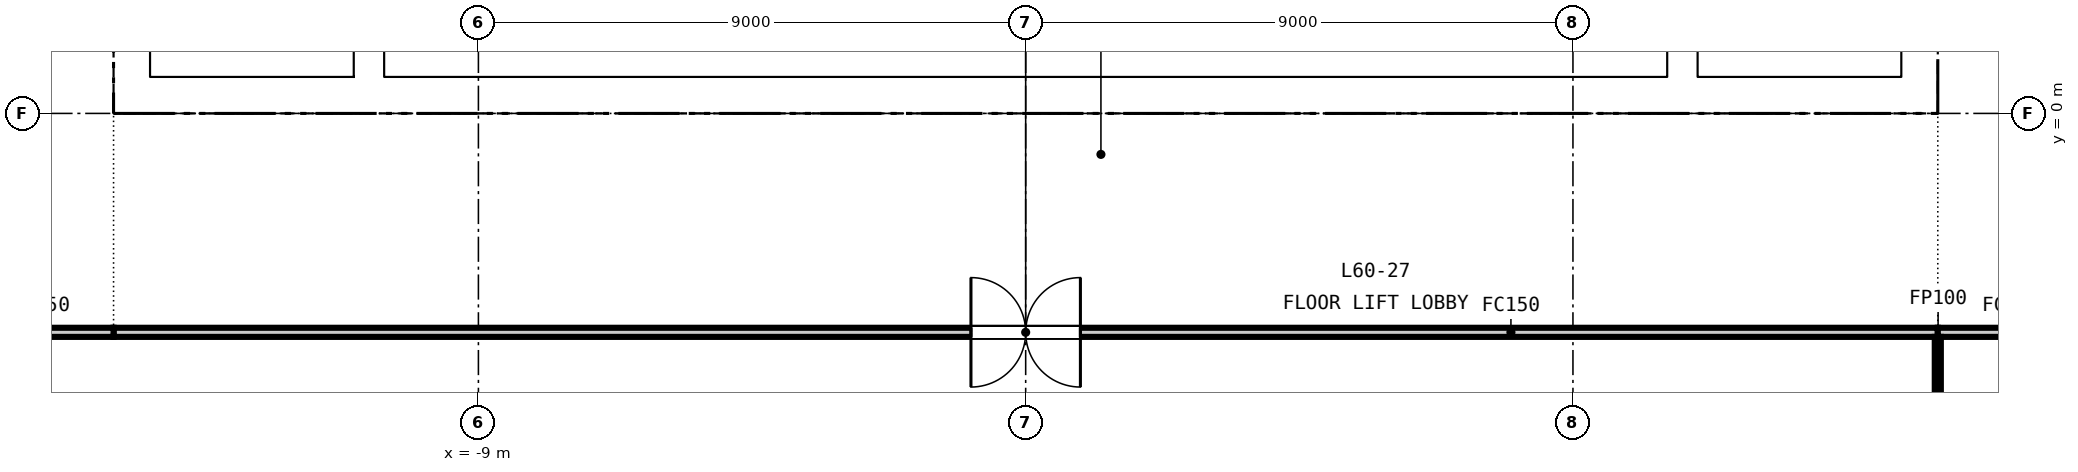
"""IFC4 building model, lengths in metres.
Left out: names, types, materials, properties, quantities, classifications, styles, units other than length and angle.
Written with IfcOpenShell. Run it as: python <this file> out.ifc"""

import sys

from ifc_helpers import new_model, si_unit, direction, frame, frame_2d, origin, place, context, subcontext, project, spatial, rectangle, extrude, element, fill, save


model = new_model("IFC4")
c1 = context("Model", 3, precision=1e-05, world=origin(), true_north=direction((0.0, 1.0)))
c2 = subcontext(c1, "Body", "Model", "MODEL_VIEW")
j1 = project(units=[si_unit("LENGTHUNIT", "METRE"), si_unit("PLANEANGLEUNIT", "RADIAN")], contexts=[c1])
p1 = place(None, origin())
s1 = spatial("IfcSite", under=j1, at=p1, CompositionType="ELEMENT")
p2 = place(p1, origin())
s2 = spatial("IfcBuilding", under=s1, at=p2, CompositionType="ELEMENT")
p3 = place(p2, frame((0.0, 0.0, 238.2)))
s3 = spatial("IfcBuildingStorey", under=s2, at=p3, CompositionType="ELEMENT", Elevation=238.2)
p4 = place(p3, frame((-15.0, 0.3, -0.15), z_axis=(0.0, 0.0, 1.0), x_axis=(1.0, 0.0, 0.0)))
e1 = element("IfcWall", 1, at=p4, inside=s3, PredefinedType="SOLIDWALL", context=c2, shape_type="SweptSolid", body=[
    extrude(rectangle(XDim=30.0, YDim=0.6, at=frame_2d((15.0, 0.0))), origin(), (0.0, 0.0, 1.0), 3.65),
])
p5 = place(p4, frame((5.8, 0.0, 0.15)))
e2 = element("IfcOpeningElement", 2, at=p5, cuts=e1, PredefinedType="OPENING", context=c2, shape_type="SweptSolid", body=[
    extrude(rectangle(XDim=2.4, YDim=2.4, at=frame_2d((1.2, 1.2))), frame((0.0, 0.31, 0.0), z_axis=(0.0, -1.0, 0.0), x_axis=(1.0, 0.0, 0.0)), (0.0, 0.0, 1.0), 0.62),
])
p6 = place(p4, frame((13.8, 0.0, 0.15)))
e3 = element("IfcOpeningElement", 3, at=p6, cuts=e1, PredefinedType="OPENING", context=c2, shape_type="SweptSolid", body=[
    extrude(rectangle(XDim=2.4, YDim=2.4, at=frame_2d((1.2, 1.2))), frame((0.0, 0.31, 0.0), z_axis=(0.0, -1.0, 0.0), x_axis=(1.0, 0.0, 0.0)), (0.0, 0.0, 1.0), 0.62),
])
p7 = place(p4, frame((21.8, 0.0, 0.15)))
e4 = element("IfcOpeningElement", 4, at=p7, cuts=e1, PredefinedType="OPENING", context=c2, shape_type="SweptSolid", body=[
    extrude(rectangle(XDim=2.4, YDim=2.4, at=frame_2d((1.2, 1.2))), frame((0.0, 0.31, 0.0), z_axis=(0.0, -1.0, 0.0), x_axis=(1.0, 0.0, 0.0)), (0.0, 0.0, 1.0), 0.62),
])
p8 = place(p4, frame((1.5, 0.0, 0.15)))
e5 = element("IfcOpeningElement", 5, at=p8, cuts=e1, PredefinedType="OPENING", context=c2, shape_type="SweptSolid", body=[
    extrude(rectangle(XDim=1.2, YDim=2.1, at=frame_2d((0.6, 1.05))), frame((0.0, 0.31, 0.0), z_axis=(0.0, -1.0, 0.0), x_axis=(1.0, 0.0, 0.0)), (0.0, 0.0, 1.0), 0.62),
])
p9 = place(p4, frame((27.3, 0.0, 0.15)))
e6 = element("IfcOpeningElement", 6, at=p9, cuts=e1, PredefinedType="OPENING", context=c2, shape_type="SweptSolid", body=[
    extrude(rectangle(XDim=1.2, YDim=2.1, at=frame_2d((0.6, 1.05))), frame((0.0, 0.31, 0.0), z_axis=(0.0, -1.0, 0.0), x_axis=(1.0, 0.0, 0.0)), (0.0, 0.0, 1.0), 0.62),
])
for number, where, z_axis, x_axis in (
    (7, (-14.7, 0.6, -0.15), (0.0, 0.0, 1.0), (0.0, 1.0, 0.0)),
    (8, (14.7, 0.6, -0.15), (0.0, 0.0, 1.0), (0.0, 1.0, 0.0)),
):
    element("IfcWall", number, at=place(p3, frame(where, z_axis=z_axis, x_axis=x_axis)), inside=s3, PredefinedType="SOLIDWALL", context=c2, shape_type="SweptSolid", body=[
        extrude(rectangle(XDim=13.8, YDim=0.6, at=frame_2d((6.9, 0.0))), origin(), (0.0, 0.0, 1.0), 3.65),
    ])
for number, where, z_axis, x_axis in (
    (9, (-10.8, 0.6, -0.15), (0.0, 0.0, 1.0), (0.0, 1.0, 0.0)),
    (10, (10.8, 0.6, -0.15), (0.0, 0.0, 1.0), (0.0, 1.0, 0.0)),
):
    element("IfcWall", number, at=place(p3, frame(where, z_axis=z_axis, x_axis=x_axis)), inside=s3, PredefinedType="SOLIDWALL", context=c2, shape_type="SweptSolid", body=[
        extrude(rectangle(XDim=13.8, YDim=0.5, at=frame_2d((6.9, 0.0))), origin(), (0.0, 0.0, 1.0), 3.65),
    ])
for number, where, z_axis, x_axis in (
    (11, (-14.2, 0.6, 0.0), (0.0, 0.0, 1.0), (0.0, 1.0, 0.0)),
    (12, (14.2, 0.6, 0.0), (0.0, 0.0, 1.0), (0.0, 1.0, 0.0)),
):
    element("IfcWall", number, at=place(p3, frame(where, z_axis=z_axis, x_axis=x_axis)), inside=s3, PredefinedType="SOLIDWALL", context=c2, shape_type="SweptSolid", body=[
        extrude(rectangle(XDim=13.8, YDim=0.4, at=frame_2d((6.9, 0.0))), origin(), (0.0, 0.0, 1.0), 3.5),
    ])
p10 = place(p3, frame((15.0, -3.6, 0.0), z_axis=(0.0, 0.0, 1.0), x_axis=(-1.0, 0.0, 0.0)))
e13 = element("IfcWall", 13, at=p10, inside=s3, PredefinedType="PARTITIONING", context=c2, shape_type="SweptSolid", body=[
    extrude(rectangle(XDim=30.0, YDim=0.15, at=frame_2d((15.0, 0.0))), origin(), (0.0, 0.0, 1.0), 2.751),
])
p11 = place(p10, frame((14.1, 0.0, 0.0)))
e14 = element("IfcOpeningElement", 14, at=p11, cuts=e13, PredefinedType="OPENING", context=c2, shape_type="SweptSolid", body=[
    extrude(rectangle(XDim=1.8, YDim=2.1, at=frame_2d((0.9, 1.05))), frame((0.0, 0.085, 0.0), z_axis=(0.0, -1.0, 0.0), x_axis=(1.0, 0.0, 0.0)), (0.0, 0.0, 1.0), 0.17),
])
for number, where, z_axis, x_axis in (
    (15, (17.4, -3.6, 0.0), (0.0, 0.0, 1.0), (-1.0, 0.0, 0.0)),
    (16, (-15.0, -3.6, 0.0), (0.0, 0.0, 1.0), (-1.0, 0.0, 0.0)),
):
    element("IfcWall", number, at=place(p3, frame(where, z_axis=z_axis, x_axis=x_axis)), inside=s3, PredefinedType="PARTITIONING", context=c2, shape_type="SweptSolid", body=[
        extrude(rectangle(XDim=2.4, YDim=0.15, at=frame_2d((1.2, 0.0))), origin(), (0.0, 0.0, 1.0), 2.751),
    ])
p12 = place(p3, frame((15.0, -8.685, 0.0), z_axis=(0.0, 0.0, 1.0), x_axis=(0.0, 1.0, 0.0)))
e17 = element("IfcWall", 17, at=p12, inside=s3, PredefinedType="PARTITIONING", context=c2, shape_type="SweptSolid", body=[
    extrude(rectangle(XDim=5.01, YDim=0.1, at=frame_2d((2.505, 0.0))), origin(), (0.0, 0.0, 1.0), 2.751),
])
p13 = place(p5, origin())
e18 = element("IfcDoor", 18, at=p13, inside=s3, OperationType="DOUBLE_DOOR_DOUBLE_SWING", PredefinedType="DOOR", context=c2, shape_type="SweptSolid", body=[
    extrude(rectangle(XDim=2.4, YDim=2.4, at=frame_2d((1.2, 1.2))), frame((0.0, 0.025, 0.0), z_axis=(0.0, -1.0, 0.0), x_axis=(1.0, 0.0, 0.0)), (0.0, 0.0, 1.0), 0.05),
])
fill(e2, e18)
p14 = place(p6, origin())
e19 = element("IfcDoor", 19, at=p14, inside=s3, OperationType="DOUBLE_DOOR_DOUBLE_SWING", PredefinedType="DOOR", context=c2, shape_type="SweptSolid", body=[
    extrude(rectangle(XDim=2.4, YDim=2.4, at=frame_2d((1.2, 1.2))), frame((0.0, 0.025, 0.0), z_axis=(0.0, -1.0, 0.0), x_axis=(1.0, 0.0, 0.0)), (0.0, 0.0, 1.0), 0.05),
])
fill(e3, e19)
p15 = place(p7, origin())
e20 = element("IfcDoor", 20, at=p15, inside=s3, OperationType="DOUBLE_DOOR_DOUBLE_SWING", PredefinedType="DOOR", context=c2, shape_type="SweptSolid", body=[
    extrude(rectangle(XDim=2.4, YDim=2.4, at=frame_2d((1.2, 1.2))), frame((0.0, 0.025, 0.0), z_axis=(0.0, -1.0, 0.0), x_axis=(1.0, 0.0, 0.0)), (0.0, 0.0, 1.0), 0.05),
])
fill(e4, e20)
p16 = place(p8, origin())
e21 = element("IfcDoor", 21, at=p16, inside=s3, OperationType="SINGLE_SWING_LEFT", PredefinedType="DOOR", context=c2, shape_type="SweptSolid", body=[
    extrude(rectangle(XDim=1.2, YDim=2.1, at=frame_2d((0.6, 1.05))), frame((0.0, 0.025, 0.0), z_axis=(0.0, -1.0, 0.0), x_axis=(1.0, 0.0, 0.0)), (0.0, 0.0, 1.0), 0.05),
])
fill(e5, e21)
p17 = place(p9, origin())
e22 = element("IfcDoor", 22, at=p17, inside=s3, OperationType="SINGLE_SWING_RIGHT", PredefinedType="DOOR", context=c2, shape_type="SweptSolid", body=[
    extrude(rectangle(XDim=1.2, YDim=2.1, at=frame_2d((0.6, 1.05))), frame((0.0, 0.025, 0.0), z_axis=(0.0, -1.0, 0.0), x_axis=(1.0, 0.0, 0.0)), (0.0, 0.0, 1.0), 0.05),
])
fill(e6, e22)
p18 = place(p11, origin())
e23 = element("IfcDoor", 23, at=p18, inside=s3, OperationType="DOUBLE_DOOR_DOUBLE_SWING", PredefinedType="DOOR", context=c2, shape_type="SweptSolid", body=[
    extrude(rectangle(XDim=1.8, YDim=2.1, at=frame_2d((0.9, 1.05))), frame((0.0, 0.025, 0.0), z_axis=(0.0, -1.0, 0.0), x_axis=(1.0, 0.0, 0.0)), (0.0, 0.0, 1.0), 0.05),
])
fill(e14, e23)
save(model, sys.argv[1])
